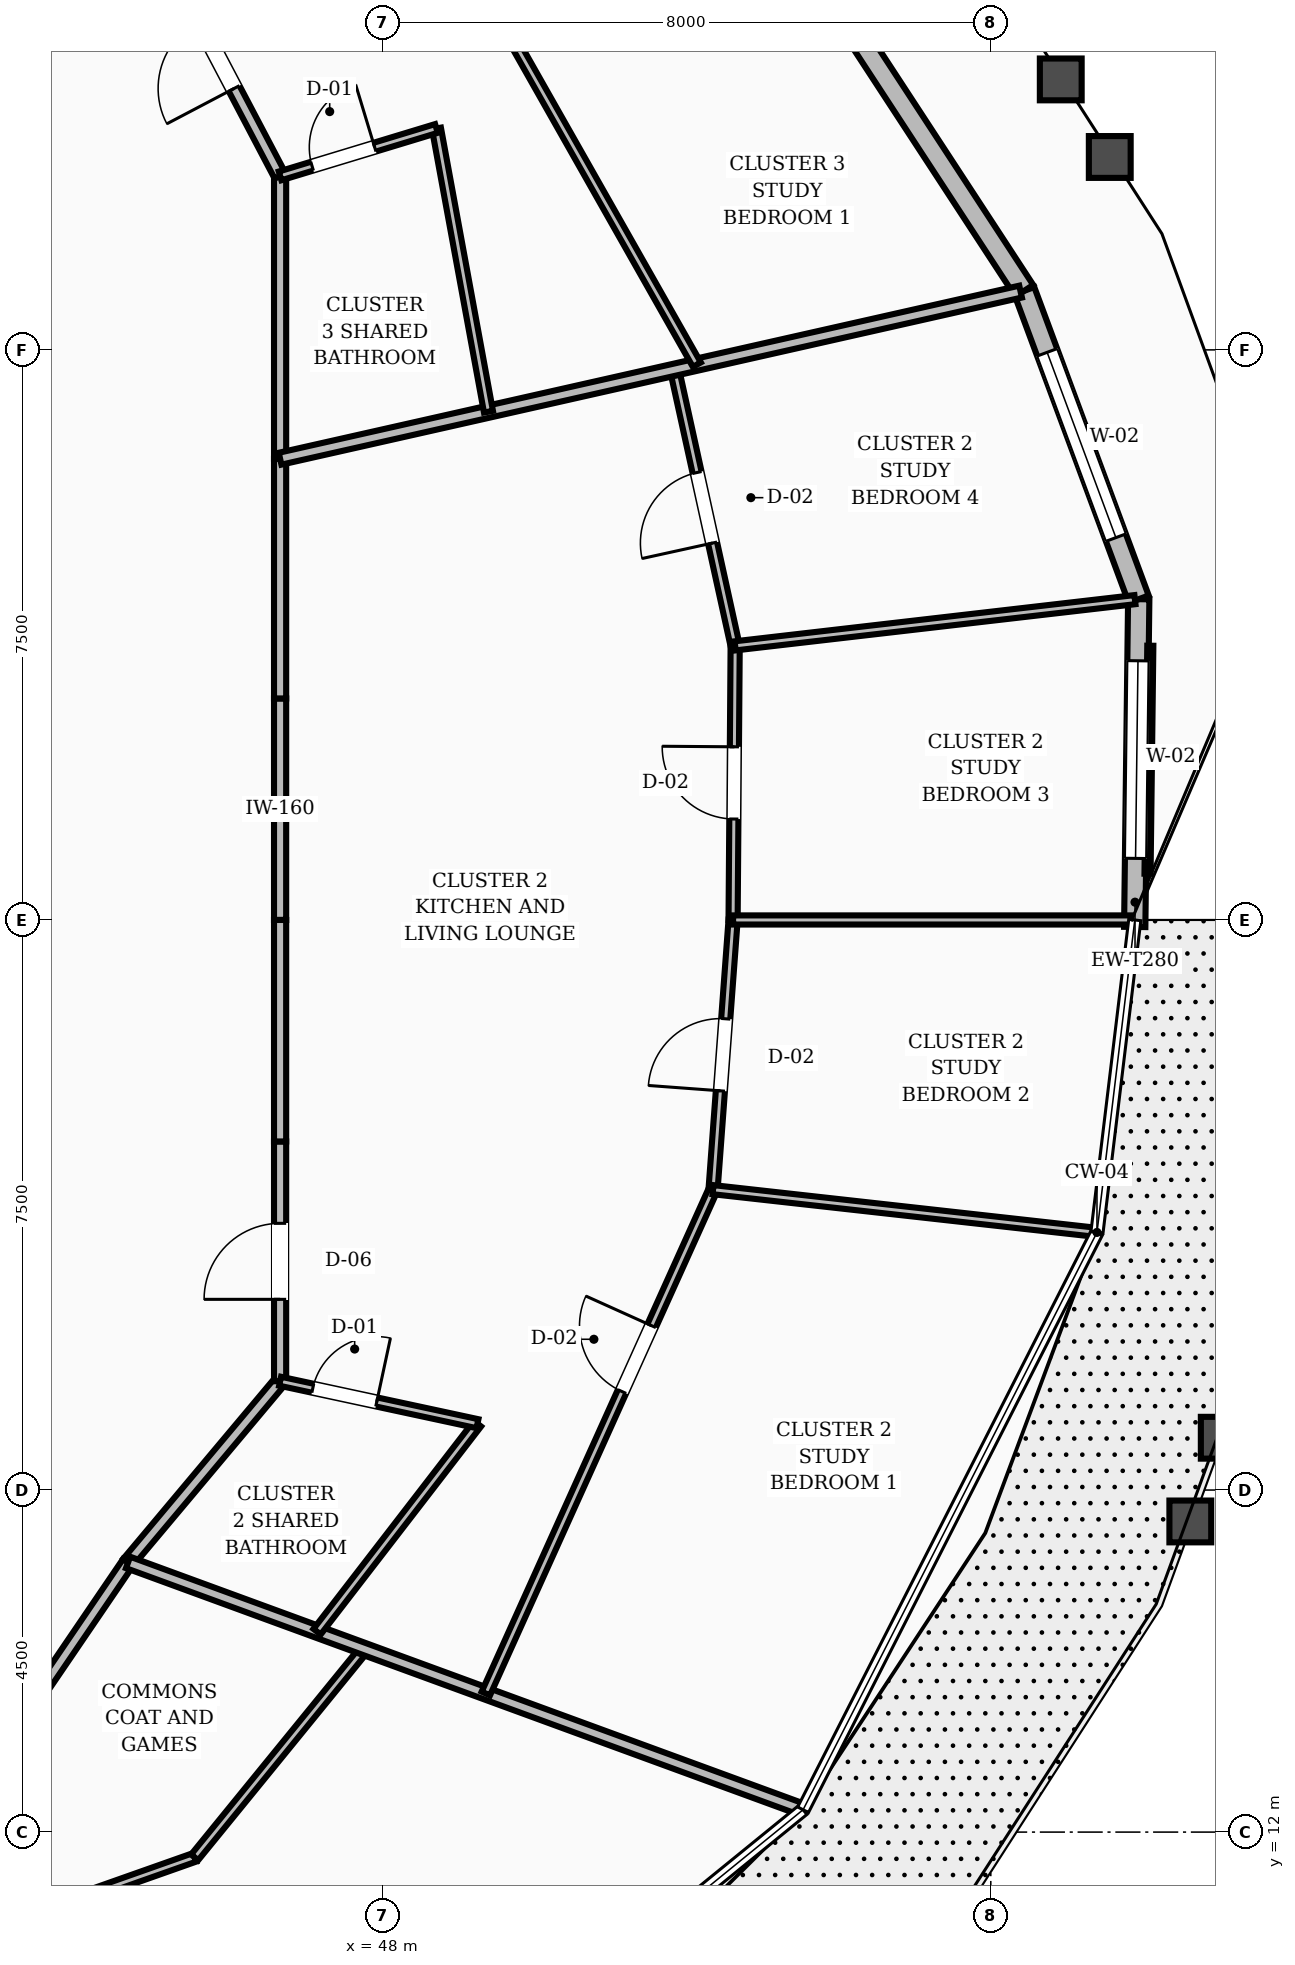
"""IFC4 building model, lengths in metres.
Left out: names, types, materials, properties, quantities, classifications, styles, units other than length and angle.
Written with IfcOpenShell. Run it as: python <this file> out.ifc"""

import sys

from ifc_helpers import new_model, si_unit, direction, frame, frame_2d, origin, place, context, subcontext, project, spatial, rectangle, extrude, element, fill, save


model = new_model("IFC4")
c1 = context("Model", 3, precision=1e-05, world=origin(), true_north=direction((0.0, 1.0)))
c2 = subcontext(c1, "Body", "Model", "MODEL_VIEW")
j1 = project(units=[si_unit("LENGTHUNIT", "METRE"), si_unit("PLANEANGLEUNIT", "RADIAN")], contexts=[c1])
p1 = place(None, origin())
s1 = spatial("IfcSite", under=j1, at=p1, CompositionType="ELEMENT")
p2 = place(p1, origin())
s2 = spatial("IfcBuilding", under=s1, at=p2, CompositionType="ELEMENT")
p3 = place(p2, frame((0.0, 0.0, 142.4)))
s3 = spatial("IfcBuildingStorey", under=s2, at=p3, CompositionType="ELEMENT", Elevation=142.4)
p4 = place(p3, frame((57.894, 23.908, 0.0), z_axis=(0.0, 0.0, 1.0), x_axis=(0.012228731111, 0.999925226272, 0.0)))
e1 = element("IfcWall", 1, at=p4, inside=s3, PredefinedType="STANDARD", context=c2, shape_type="SweptSolid", body=[
    extrude(rectangle(XDim=4.312, YDim=0.28, at=frame_2d((2.156, 0.0))), origin(), (0.0, 0.0, 1.0), 2.82),
])
p5 = place(p4, frame((0.902, 0.0, 0.8)))
e2 = element("IfcOpeningElement", 2, at=p5, cuts=e1, PredefinedType="OPENING", context=c2, shape_type="SweptSolid", body=[
    extrude(rectangle(XDim=2.6, YDim=1.65, at=frame_2d((1.3, 0.825))), frame((0.0, 0.15, 0.0), z_axis=(0.0, -1.0, 0.0), x_axis=(1.0, 0.0, 0.0)), (0.0, 0.0, 1.0), 0.3),
])
p6 = place(p3, frame((57.946, 28.22, 0.0), z_axis=(0.0, 0.0, 1.0), x_axis=(-0.347832416273, 0.937556723719, 0.0)))
e3 = element("IfcWall", 3, at=p6, inside=s3, PredefinedType="STANDARD", context=c2, shape_type="SweptSolid", body=[
    extrude(rectangle(XDim=4.328, YDim=0.28, at=frame_2d((2.164, 0.0))), origin(), (0.0, 0.0, 1.0), 2.82),
])
p7 = place(p6, frame((0.864, 0.0, 0.8)))
e4 = element("IfcOpeningElement", 4, at=p7, cuts=e3, PredefinedType="OPENING", context=c2, shape_type="SweptSolid", body=[
    extrude(rectangle(XDim=2.6, YDim=1.65, at=frame_2d((1.3, 0.825))), frame((0.0, 0.15, 0.0), z_axis=(0.0, -1.0, 0.0), x_axis=(1.0, 0.0, 0.0)), (0.0, 0.0, 1.0), 0.3),
])
p8 = place(p3, frame((56.441, 32.278, 0.0), z_axis=(0.0, 0.0, 1.0), x_axis=(-0.547212555107, 0.836993679506, 0.0)))
e5 = element("IfcWall", 5, at=p8, inside=s3, PredefinedType="STANDARD", context=c2, shape_type="SweptSolid", body=[
    extrude(rectangle(XDim=4.468, YDim=0.28, at=frame_2d((2.234, 0.0))), origin(), (0.0, 0.0, 1.0), 2.82),
])
p9 = place(p3, frame((46.65, 24.0, 0.0), z_axis=(0.0, 0.0, 1.0), x_axis=(0.0, 1.0, 0.0)))
e6 = element("IfcWall", 6, at=p9, inside=s3, PredefinedType="SOLIDWALL", context=c2, shape_type="SweptSolid", body=[
    extrude(rectangle(XDim=2.914, YDim=0.16, at=frame_2d((1.457, 0.0))), origin(), (0.0, 0.0, 1.0), 2.8),
])
p10 = place(p3, frame((46.65, 26.914, 0.0), z_axis=(0.0, 0.0, 1.0), x_axis=(0.0, 1.0, 0.0)))
e7 = element("IfcWall", 7, at=p10, inside=s3, PredefinedType="SOLIDWALL", context=c2, shape_type="SweptSolid", body=[
    extrude(rectangle(XDim=3.154, YDim=0.16, at=frame_2d((1.577, 0.0))), origin(), (0.0, 0.0, 1.0), 2.8),
])
p11 = place(p3, frame((46.65, 30.068, 0.0), z_axis=(0.0, 0.0, 1.0), x_axis=(0.0, 1.0, 0.0)))
e8 = element("IfcWall", 8, at=p11, inside=s3, PredefinedType="SOLIDWALL", context=c2, shape_type="SweptSolid", body=[
    extrude(rectangle(XDim=3.721, YDim=0.16, at=frame_2d((1.86, 0.0))), origin(), (0.0, 0.0, 1.0), 2.8),
])
p12 = place(p3, frame((46.65, 33.789, 0.0), z_axis=(0.0, 0.0, 1.0), x_axis=(-0.46527115782, 0.885168204185, 0.0)))
e9 = element("IfcWall", 9, at=p12, inside=s3, PredefinedType="SOLIDWALL", context=c2, shape_type="SweptSolid", body=[
    extrude(rectangle(XDim=3.6, YDim=0.16, at=frame_2d((1.8, 0.0))), origin(), (0.0, 0.0, 1.0), 2.8),
])
p13 = place(p12, frame((1.3, 0.0, 0.0)))
e10 = element("IfcOpeningElement", 10, at=p13, cuts=e9, PredefinedType="OPENING", context=c2, shape_type="SweptSolid", body=[
    extrude(rectangle(XDim=1.0, YDim=2.1, at=frame_2d((0.5, 1.05))), frame((0.0, 0.09, 0.0), z_axis=(0.0, -1.0, 0.0), x_axis=(1.0, 0.0, 0.0)), (0.0, 0.0, 1.0), 0.18),
])
p14 = place(p3, frame((42.95, 13.05, 0.0), z_axis=(0.0, 0.0, 1.0), x_axis=(0.562674669208, 0.826678423955, 0.0)))
e11 = element("IfcWall", 11, at=p14, inside=s3, PredefinedType="SOLIDWALL", context=c2, shape_type="SweptSolid", body=[
    extrude(rectangle(XDim=3.021, YDim=0.16, at=frame_2d((1.511, 0.0))), origin(), (0.0, 0.0, 1.0), 2.8),
])
p15 = place(p3, frame((44.65, 15.548, 0.0), z_axis=(0.0, 0.0, 1.0), x_axis=(0.642665742791, 0.76614668507, 0.0)))
e12 = element("IfcWall", 12, at=p15, inside=s3, PredefinedType="SOLIDWALL", context=c2, shape_type="SweptSolid", body=[
    extrude(rectangle(XDim=3.112, YDim=0.16, at=frame_2d((1.556, 0.0))), origin(), (0.0, 0.0, 1.0), 2.8),
])
p16 = place(p3, frame((46.65, 17.932, 0.0), z_axis=(0.0, 0.0, 1.0), x_axis=(0.0, 1.0, 0.0)))
e13 = element("IfcWall", 13, at=p16, inside=s3, PredefinedType="SOLIDWALL", context=c2, shape_type="SweptSolid", body=[
    extrude(rectangle(XDim=3.154, YDim=0.16, at=frame_2d((1.577, 0.0))), origin(), (0.0, 0.0, 1.0), 2.8),
])
p17 = place(p16, frame((1.077, 0.0, 0.0)))
e14 = element("IfcOpeningElement", 14, at=p17, cuts=e13, PredefinedType="OPENING", context=c2, shape_type="SweptSolid", body=[
    extrude(rectangle(XDim=1.0, YDim=2.1, at=frame_2d((0.5, 1.05))), frame((0.0, 0.09, 0.0), z_axis=(0.0, -1.0, 0.0), x_axis=(1.0, 0.0, 0.0)), (0.0, 0.0, 1.0), 0.18),
])
p18 = place(p3, frame((46.65, 21.086, 0.0), z_axis=(0.0, 0.0, 1.0), x_axis=(0.0, 1.0, 0.0)))
e15 = element("IfcWall", 15, at=p18, inside=s3, PredefinedType="SOLIDWALL", context=c2, shape_type="SweptSolid", body=[
    extrude(rectangle(XDim=2.914, YDim=0.16, at=frame_2d((1.457, 0.0))), origin(), (0.0, 0.0, 1.0), 2.8),
])
p19 = place(p3, frame((42.008, 10.426, 0.0), z_axis=(0.0, 0.0, 1.0), x_axis=(0.94294683511, 0.332943337754, 0.0)))
e16 = element("IfcWall", 16, at=p19, inside=s3, PredefinedType="PARTITIONING", context=c2, shape_type="SweptSolid", body=[
    extrude(rectangle(XDim=3.731, YDim=0.12, at=frame_2d((1.865, 0.0))), origin(), (0.0, 0.0, 1.0), 2.8),
])
p20 = place(p3, frame((45.526, 11.668, 0.0), z_axis=(0.0, 0.0, 1.0), x_axis=(0.631502283557, 0.775374016757, 0.0)))
e17 = element("IfcWall", 17, at=p20, inside=s3, PredefinedType="PARTITIONING", context=c2, shape_type="SweptSolid", body=[
    extrude(rectangle(XDim=3.535, YDim=0.12, at=frame_2d((1.767, 0.0))), origin(), (0.0, 0.0, 1.0), 2.8),
])
p21 = place(p3, frame((44.65, 15.548, 0.0), z_axis=(0.0, 0.0, 1.0), x_axis=(0.938969383343, -0.344000722593, 0.0)))
e18 = element("IfcWall", 18, at=p21, inside=s3, PredefinedType="SOLIDWALL", context=c2, shape_type="SweptSolid", body=[
    extrude(rectangle(XDim=9.408, YDim=0.16, at=frame_2d((4.704, 0.0))), origin(), (0.0, 0.0, 1.0), 2.8),
])
p22 = place(p3, frame((47.137, 14.636, 0.0), z_axis=(0.0, 0.0, 1.0), x_axis=(0.610550329764, 0.791977458534, 0.0)))
e19 = element("IfcWall", 19, at=p22, inside=s3, PredefinedType="PARTITIONING", context=c2, shape_type="SweptSolid", body=[
    extrude(rectangle(XDim=3.456, YDim=0.12, at=frame_2d((1.728, 0.0))), origin(), (0.0, 0.0, 1.0), 2.8),
])
p23 = place(p3, frame((46.65, 17.932, 0.0), z_axis=(0.0, 0.0, 1.0), x_axis=(0.977635307492, -0.210307407253, 0.0)))
e20 = element("IfcWall", 20, at=p23, inside=s3, PredefinedType="PARTITIONING", context=c2, shape_type="SweptSolid", body=[
    extrude(rectangle(XDim=2.656, YDim=0.12, at=frame_2d((1.328, 0.0))), origin(), (0.0, 0.0, 1.0), 2.8),
])
p24 = place(p23, frame((0.44, 0.0, 0.0)))
e21 = element("IfcOpeningElement", 21, at=p24, cuts=e20, PredefinedType="OPENING", context=c2, shape_type="SweptSolid", body=[
    extrude(rectangle(XDim=0.86, YDim=2.1, at=frame_2d((0.43, 1.05))), frame((0.0, 0.07, 0.0), z_axis=(0.0, -1.0, 0.0), x_axis=(1.0, 0.0, 0.0)), (0.0, 0.0, 1.0), 0.14),
])
p25 = place(p3, frame((49.357, 13.823, 0.0), z_axis=(0.0, 0.0, 1.0), x_axis=(0.411079306234, 0.911599585337, 0.0)))
e22 = element("IfcWall", 22, at=p25, inside=s3, PredefinedType="PARTITIONING", context=c2, shape_type="SweptSolid", body=[
    extrude(rectangle(XDim=7.272, YDim=0.12, at=frame_2d((3.636, 0.0))), origin(), (0.0, 0.0, 1.0), 2.8),
])
p26 = place(p25, frame((4.358, 0.0, 0.0)))
e23 = element("IfcOpeningElement", 23, at=p26, cuts=e22, PredefinedType="OPENING", context=c2, shape_type="SweptSolid", body=[
    extrude(rectangle(XDim=0.95, YDim=2.1, at=frame_2d((0.475, 1.05))), frame((0.0, 0.07, 0.0), z_axis=(0.0, -1.0, 0.0), x_axis=(1.0, 0.0, 0.0)), (0.0, 0.0, 1.0), 0.14),
])
p27 = place(p3, frame((52.346, 20.452, 0.0), z_axis=(0.0, 0.0, 1.0), x_axis=(0.074109277966, 0.997250126558, 0.0)))
e24 = element("IfcWall", 24, at=p27, inside=s3, PredefinedType="PARTITIONING", context=c2, shape_type="SweptSolid", body=[
    extrude(rectangle(XDim=3.558, YDim=0.12, at=frame_2d((1.779, 0.0))), origin(), (0.0, 0.0, 1.0), 2.8),
])
p28 = place(p27, frame((1.304, 0.0, 0.0)))
e25 = element("IfcOpeningElement", 25, at=p28, cuts=e24, PredefinedType="OPENING", context=c2, shape_type="SweptSolid", body=[
    extrude(rectangle(XDim=0.95, YDim=2.1, at=frame_2d((0.475, 1.05))), frame((0.0, 0.07, 0.0), z_axis=(0.0, -1.0, 0.0), x_axis=(1.0, 0.0, 0.0)), (0.0, 0.0, 1.0), 0.14),
])
p29 = place(p3, frame((52.346, 20.452, 0.0), z_axis=(0.0, 0.0, 1.0), x_axis=(0.99385826802, -0.110660485666, 0.0)))
e26 = element("IfcWall", 26, at=p29, inside=s3, PredefinedType="PARTITIONING", context=c2, shape_type="SweptSolid", body=[
    extrude(rectangle(XDim=5.032, YDim=0.12, at=frame_2d((2.516, 0.0))), origin(), (0.0, 0.0, 1.0), 2.8),
])
p30 = place(p3, frame((52.61, 24.0, 0.0), z_axis=(0.0, 0.0, 1.0), x_axis=(0.007582207063, 0.999971254655, 0.0)))
e27 = element("IfcWall", 27, at=p30, inside=s3, PredefinedType="PARTITIONING", context=c2, shape_type="SweptSolid", body=[
    extrude(rectangle(XDim=3.606, YDim=0.12, at=frame_2d((1.803, 0.0))), origin(), (0.0, 0.0, 1.0), 2.8),
])
p31 = place(p30, frame((1.328, 0.0, 0.0)))
e28 = element("IfcOpeningElement", 28, at=p31, cuts=e27, PredefinedType="OPENING", context=c2, shape_type="SweptSolid", body=[
    extrude(rectangle(XDim=0.95, YDim=2.1, at=frame_2d((0.475, 1.05))), frame((0.0, 0.07, 0.0), z_axis=(0.0, -1.0, 0.0), x_axis=(1.0, 0.0, 0.0)), (0.0, 0.0, 1.0), 0.14),
])
p32 = place(p3, frame((52.61, 24.0, 0.0), z_axis=(0.0, 0.0, 1.0), x_axis=(1.0, 0.0, 0.0)))
e29 = element("IfcWall", 29, at=p32, inside=s3, PredefinedType="PARTITIONING", context=c2, shape_type="SweptSolid", body=[
    extrude(rectangle(XDim=5.235, YDim=0.12, at=frame_2d((2.617, 0.0))), origin(), (0.0, 0.0, 1.0), 2.8),
])
p33 = place(p3, frame((52.637, 27.606, 0.0), z_axis=(0.0, 0.0, 1.0), x_axis=(-0.214497403301, 0.97672455891, 0.0)))
e30 = element("IfcWall", 30, at=p33, inside=s3, PredefinedType="PARTITIONING", context=c2, shape_type="SweptSolid", body=[
    extrude(rectangle(XDim=3.72, YDim=0.12, at=frame_2d((1.86, 0.0))), origin(), (0.0, 0.0, 1.0), 2.8),
])
p34 = place(p33, frame((1.385, 0.0, 0.0)))
e31 = element("IfcOpeningElement", 31, at=p34, cuts=e30, PredefinedType="OPENING", context=c2, shape_type="SweptSolid", body=[
    extrude(rectangle(XDim=0.95, YDim=2.1, at=frame_2d((0.475, 1.05))), frame((0.0, 0.07, 0.0), z_axis=(0.0, -1.0, 0.0), x_axis=(1.0, 0.0, 0.0)), (0.0, 0.0, 1.0), 0.14),
])
p35 = place(p3, frame((52.637, 27.606, 0.0), z_axis=(0.0, 0.0, 1.0), x_axis=(0.993386500481, 0.1148183812, 0.0)))
e32 = element("IfcWall", 32, at=p35, inside=s3, PredefinedType="PARTITIONING", context=c2, shape_type="SweptSolid", body=[
    extrude(rectangle(XDim=5.294, YDim=0.12, at=frame_2d((2.647, 0.0))), origin(), (0.0, 0.0, 1.0), 2.8),
])
p36 = place(p3, frame((46.65, 30.068, 0.0), z_axis=(0.0, 0.0, 1.0), x_axis=(0.97547030374, 0.220131066689, 0.0)))
e33 = element("IfcWall", 33, at=p36, inside=s3, PredefinedType="SOLIDWALL", context=c2, shape_type="SweptSolid", body=[
    extrude(rectangle(XDim=9.987, YDim=0.16, at=frame_2d((4.994, 0.0))), origin(), (0.0, 0.0, 1.0), 2.8),
])
p37 = place(p3, frame((49.392, 30.687, 0.0), z_axis=(0.0, 0.0, 1.0), x_axis=(-0.180762204069, 0.983526830127, 0.0)))
e34 = element("IfcWall", 34, at=p37, inside=s3, PredefinedType="PARTITIONING", context=c2, shape_type="SweptSolid", body=[
    extrude(rectangle(XDim=3.789, YDim=0.12, at=frame_2d((1.894, 0.0))), origin(), (0.0, 0.0, 1.0), 2.8),
])
p38 = place(p3, frame((46.65, 33.789, 0.0), z_axis=(0.0, 0.0, 1.0), x_axis=(0.956930737549, 0.290316316341, 0.0)))
e35 = element("IfcWall", 35, at=p38, inside=s3, PredefinedType="PARTITIONING", context=c2, shape_type="SweptSolid", body=[
    extrude(rectangle(XDim=2.149, YDim=0.12, at=frame_2d((1.075, 0.0))), origin(), (0.0, 0.0, 1.0), 2.8),
])
p39 = place(p38, frame((0.44, 0.0, 0.0)))
e36 = element("IfcOpeningElement", 36, at=p39, cuts=e35, PredefinedType="OPENING", context=c2, shape_type="SweptSolid", body=[
    extrude(rectangle(XDim=0.86, YDim=2.1, at=frame_2d((0.43, 1.05))), frame((0.0, 0.07, 0.0), z_axis=(0.0, -1.0, 0.0), x_axis=(1.0, 0.0, 0.0)), (0.0, 0.0, 1.0), 0.14),
])
p40 = place(p3, frame((52.133, 31.305, 0.0), z_axis=(0.0, 0.0, 1.0), x_axis=(-0.492944891057, 0.870060534895, 0.0)))
e37 = element("IfcWall", 37, at=p40, inside=s3, PredefinedType="PARTITIONING", context=c2, shape_type="SweptSolid", body=[
    extrude(rectangle(XDim=8.01, YDim=0.12, at=frame_2d((4.005, 0.0))), origin(), (0.0, 0.0, 1.0), 2.8),
])
p41 = place(p40, frame((4.889, 0.0, 0.0)))
e38 = element("IfcOpeningElement", 38, at=p41, cuts=e37, PredefinedType="OPENING", context=c2, shape_type="SweptSolid", body=[
    extrude(rectangle(XDim=0.95, YDim=2.1, at=frame_2d((0.475, 1.05))), frame((0.0, 0.07, 0.0), z_axis=(0.0, -1.0, 0.0), x_axis=(1.0, 0.0, 0.0)), (0.0, 0.0, 1.0), 0.14),
])
p42 = place(p5, origin())
e39 = element("IfcWindow", 39, at=p42, inside=s3, PartitioningType="SINGLE_PANEL", PredefinedType="WINDOW", context=c2, shape_type="SweptSolid", body=[
    extrude(rectangle(XDim=2.6, YDim=1.65, at=frame_2d((1.3, 0.825))), frame((0.0, 0.03, 0.0), z_axis=(0.0, -1.0, 0.0), x_axis=(1.0, 0.0, 0.0)), (0.0, 0.0, 1.0), 0.06),
])
fill(e2, e39)
p43 = place(p7, origin())
e40 = element("IfcWindow", 40, at=p43, inside=s3, PartitioningType="SINGLE_PANEL", PredefinedType="WINDOW", context=c2, shape_type="SweptSolid", body=[
    extrude(rectangle(XDim=2.6, YDim=1.65, at=frame_2d((1.3, 0.825))), frame((0.0, 0.03, 0.0), z_axis=(0.0, -1.0, 0.0), x_axis=(1.0, 0.0, 0.0)), (0.0, 0.0, 1.0), 0.06),
])
fill(e4, e40)
p44 = place(p24, origin())
e41 = element("IfcDoor", 41, at=p44, inside=s3, OperationType="SINGLE_SWING_RIGHT", PredefinedType="DOOR", context=c2, shape_type="SweptSolid", body=[
    extrude(rectangle(XDim=0.86, YDim=2.1, at=frame_2d((0.43, 1.05))), frame((0.0, 0.025, 0.0), z_axis=(0.0, -1.0, 0.0), x_axis=(1.0, 0.0, 0.0)), (0.0, 0.0, 1.0), 0.05),
])
fill(e21, e41)
p45 = place(p17, origin())
e42 = element("IfcDoor", 42, at=p45, inside=s3, OperationType="SINGLE_SWING_LEFT", PredefinedType="DOOR", context=c2, shape_type="SweptSolid", body=[
    extrude(rectangle(XDim=1.0, YDim=2.1, at=frame_2d((0.5, 1.05))), frame((0.0, 0.025, 0.0), z_axis=(0.0, -1.0, 0.0), x_axis=(1.0, 0.0, 0.0)), (0.0, 0.0, 1.0), 0.05),
])
fill(e14, e42)
p46 = place(p26, origin())
e43 = element("IfcDoor", 43, at=p46, inside=s3, OperationType="SINGLE_SWING_RIGHT", PredefinedType="DOOR", context=c2, shape_type="SweptSolid", body=[
    extrude(rectangle(XDim=0.95, YDim=2.1, at=frame_2d((0.475, 1.05))), frame((0.0, 0.025, 0.0), z_axis=(0.0, -1.0, 0.0), x_axis=(1.0, 0.0, 0.0)), (0.0, 0.0, 1.0), 0.05),
])
fill(e23, e43)
p47 = place(p28, origin())
e44 = element("IfcDoor", 44, at=p47, inside=s3, OperationType="SINGLE_SWING_LEFT", PredefinedType="DOOR", context=c2, shape_type="SweptSolid", body=[
    extrude(rectangle(XDim=0.95, YDim=2.1, at=frame_2d((0.475, 1.05))), frame((0.0, 0.025, 0.0), z_axis=(0.0, -1.0, 0.0), x_axis=(1.0, 0.0, 0.0)), (0.0, 0.0, 1.0), 0.05),
])
fill(e25, e44)
p48 = place(p31, origin())
e45 = element("IfcDoor", 45, at=p48, inside=s3, OperationType="SINGLE_SWING_RIGHT", PredefinedType="DOOR", context=c2, shape_type="SweptSolid", body=[
    extrude(rectangle(XDim=0.95, YDim=2.1, at=frame_2d((0.475, 1.05))), frame((0.0, 0.025, 0.0), z_axis=(0.0, -1.0, 0.0), x_axis=(1.0, 0.0, 0.0)), (0.0, 0.0, 1.0), 0.05),
])
fill(e28, e45)
p49 = place(p34, origin())
e46 = element("IfcDoor", 46, at=p49, inside=s3, OperationType="SINGLE_SWING_LEFT", PredefinedType="DOOR", context=c2, shape_type="SweptSolid", body=[
    extrude(rectangle(XDim=0.95, YDim=2.1, at=frame_2d((0.475, 1.05))), frame((0.0, 0.025, 0.0), z_axis=(0.0, -1.0, 0.0), x_axis=(1.0, 0.0, 0.0)), (0.0, 0.0, 1.0), 0.05),
])
fill(e31, e46)
p50 = place(p39, origin())
e47 = element("IfcDoor", 47, at=p50, inside=s3, OperationType="SINGLE_SWING_RIGHT", PredefinedType="DOOR", context=c2, shape_type="SweptSolid", body=[
    extrude(rectangle(XDim=0.86, YDim=2.1, at=frame_2d((0.43, 1.05))), frame((0.0, 0.025, 0.0), z_axis=(0.0, -1.0, 0.0), x_axis=(1.0, 0.0, 0.0)), (0.0, 0.0, 1.0), 0.05),
])
fill(e36, e47)
p51 = place(p13, origin())
e48 = element("IfcDoor", 48, at=p51, inside=s3, OperationType="SINGLE_SWING_LEFT", PredefinedType="DOOR", context=c2, shape_type="SweptSolid", body=[
    extrude(rectangle(XDim=1.0, YDim=2.1, at=frame_2d((0.5, 1.05))), frame((0.0, 0.025, 0.0), z_axis=(0.0, -1.0, 0.0), x_axis=(1.0, 0.0, 0.0)), (0.0, 0.0, 1.0), 0.05),
])
fill(e10, e48)
save(model, sys.argv[1])
